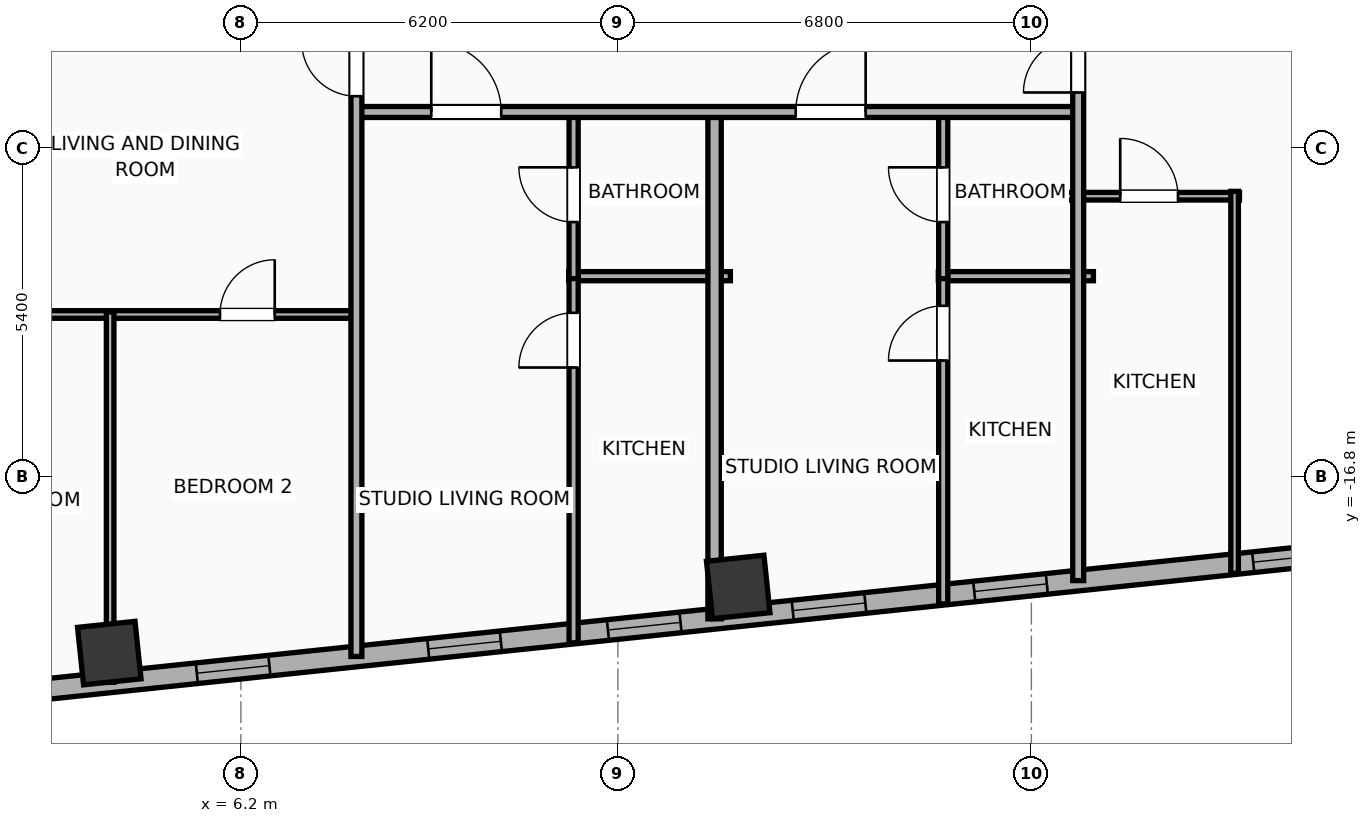
"""IFC4 building model, lengths in metres.
Left out: names, types, materials, properties, quantities, classifications, styles, units other than length and angle.
Written with IfcOpenShell. Run it as: python <this file> out.ifc"""

import sys

from ifc_helpers import new_model, si_unit, direction, frame, frame_2d, origin, origin_2d, place, context, subcontext, project, spatial, rectangle, hollow_rectangle, extrude, element, fill, save


model = new_model("IFC4")
c1 = context("Model", 3, precision=1e-05, world=origin(), true_north=direction((0.0, 1.0)))
c2 = subcontext(c1, "Body", "Model", "MODEL_VIEW")
j1 = project(units=[si_unit("LENGTHUNIT", "METRE"), si_unit("PLANEANGLEUNIT", "RADIAN")], contexts=[c1])
p1 = place(None, origin())
s1 = spatial("IfcSite", under=j1, at=p1, CompositionType="ELEMENT")
p2 = place(p1, origin())
s2 = spatial("IfcBuilding", under=s1, at=p2, CompositionType="ELEMENT")
p3 = place(p2, frame((0.0, 0.0, 175.5)))
s3 = spatial("IfcBuildingStorey", under=s2, at=p3, CompositionType="ELEMENT", Elevation=175.5)
for number, where, z_axis, x_axis in (
    (1, (4.036, -19.698, 0.0), (0.0, 0.0, 1.0), (0.995, 0.105, 0.0)),
    (2, (14.379, -18.611, 0.0), (0.0, 0.0, 1.0), (0.995, 0.105, 0.0)),
):
    element("IfcColumn", number, at=place(p3, frame(where, z_axis=z_axis, x_axis=x_axis)), inside=s3, PredefinedType="COLUMN", context=c2, shape_type="SweptSolid", body=[
        extrude(hollow_rectangle(XDim=0.95, YDim=0.95, WallThickness=0.032, at=origin_2d()), origin(), (0.0, 0.0, 1.0), 3.9),
    ])
p4 = place(p3, frame((24.756, -18.003, 0.0), z_axis=(0.0, 0.0, 1.0), x_axis=(-0.99452160744, -0.104531202687, 0.0)))
e3 = element("IfcWall", 3, at=p4, inside=s3, PredefinedType="ELEMENTEDWALL", context=c2, shape_type="SweptSolid", body=[
    extrude(rectangle(XDim=51.967, YDim=0.34, at=frame_2d((25.983, 0.0))), origin(), (0.0, 0.0, 1.0), 3.65),
])
p5 = place(p4, frame((25.633, 0.0, 0.75)))
e4 = element("IfcOpeningElement", 4, at=p5, cuts=e3, PredefinedType="OPENING", context=c2, shape_type="SweptSolid", body=[
    extrude(rectangle(XDim=2.4, YDim=2.1, at=frame_2d((1.2, 1.05))), frame((0.0, 0.18, 0.0), z_axis=(0.0, -1.0, 0.0), x_axis=(1.0, 0.0, 0.0)), (0.0, 0.0, 1.0), 0.36),
])
p6 = place(p4, frame((42.318, 0.0, 0.75)))
e5 = element("IfcOpeningElement", 5, at=p6, cuts=e3, PredefinedType="OPENING", context=c2, shape_type="SweptSolid", body=[
    extrude(rectangle(XDim=1.2, YDim=2.05, at=frame_2d((0.6, 1.025))), frame((0.0, 0.18, 0.0), z_axis=(0.0, -1.0, 0.0), x_axis=(1.0, 0.0, 0.0)), (0.0, 0.0, 1.0), 0.36),
])
p7 = place(p4, frame((34.121, 0.0, 0.75)))
e6 = element("IfcOpeningElement", 6, at=p7, cuts=e3, PredefinedType="OPENING", context=c2, shape_type="SweptSolid", body=[
    extrude(rectangle(XDim=1.2, YDim=2.05, at=frame_2d((0.6, 1.025))), frame((0.0, 0.18, 0.0), z_axis=(0.0, -1.0, 0.0), x_axis=(1.0, 0.0, 0.0)), (0.0, 0.0, 1.0), 0.36),
])
p8 = place(p4, frame((37.092, 0.0, 0.75)))
e7 = element("IfcOpeningElement", 7, at=p8, cuts=e3, PredefinedType="OPENING", context=c2, shape_type="SweptSolid", body=[
    extrude(rectangle(XDim=1.2, YDim=2.05, at=frame_2d((0.6, 1.025))), frame((0.0, 0.18, 0.0), z_axis=(0.0, -1.0, 0.0), x_axis=(1.0, 0.0, 0.0)), (0.0, 0.0, 1.0), 0.36),
])
p9 = place(p4, frame((14.359, 0.0, 0.75)))
e8 = element("IfcOpeningElement", 8, at=p9, cuts=e3, PredefinedType="OPENING", context=c2, shape_type="SweptSolid", body=[
    extrude(rectangle(XDim=1.2, YDim=2.05, at=frame_2d((0.6, 1.025))), frame((0.0, 0.18, 0.0), z_axis=(0.0, -1.0, 0.0), x_axis=(1.0, 0.0, 0.0)), (0.0, 0.0, 1.0), 0.36),
])
p10 = place(p4, frame((11.388, 0.0, 0.75)))
e9 = element("IfcOpeningElement", 9, at=p10, cuts=e3, PredefinedType="OPENING", context=c2, shape_type="SweptSolid", body=[
    extrude(rectangle(XDim=1.2, YDim=2.05, at=frame_2d((0.6, 1.025))), frame((0.0, 0.18, 0.0), z_axis=(0.0, -1.0, 0.0), x_axis=(1.0, 0.0, 0.0)), (0.0, 0.0, 1.0), 0.36),
])
p11 = place(p4, frame((8.332, 0.0, 0.75)))
e10 = element("IfcOpeningElement", 10, at=p11, cuts=e3, PredefinedType="OPENING", context=c2, shape_type="SweptSolid", body=[
    extrude(rectangle(XDim=1.2, YDim=2.05, at=frame_2d((0.6, 1.025))), frame((0.0, 0.18, 0.0), z_axis=(0.0, -1.0, 0.0), x_axis=(1.0, 0.0, 0.0)), (0.0, 0.0, 1.0), 0.36),
])
p12 = place(p4, frame((5.331, 0.0, 0.75)))
e11 = element("IfcOpeningElement", 11, at=p12, cuts=e3, PredefinedType="OPENING", context=c2, shape_type="SweptSolid", body=[
    extrude(rectangle(XDim=1.2, YDim=2.05, at=frame_2d((0.6, 1.025))), frame((0.0, 0.18, 0.0), z_axis=(0.0, -1.0, 0.0), x_axis=(1.0, 0.0, 0.0)), (0.0, 0.0, 1.0), 0.36),
])
p13 = place(p4, frame((29.313, 0.0, 0.75)))
e12 = element("IfcOpeningElement", 12, at=p13, cuts=e3, PredefinedType="OPENING", context=c2, shape_type="SweptSolid", body=[
    extrude(rectangle(XDim=1.2, YDim=2.05, at=frame_2d((0.6, 1.025))), frame((0.0, 0.18, 0.0), z_axis=(0.0, -1.0, 0.0), x_axis=(1.0, 0.0, 0.0)), (0.0, 0.0, 1.0), 0.36),
])
p14 = place(p4, frame((22.248, 0.0, 0.75)))
e13 = element("IfcOpeningElement", 13, at=p14, cuts=e3, PredefinedType="OPENING", context=c2, shape_type="SweptSolid", body=[
    extrude(rectangle(XDim=1.2, YDim=2.05, at=frame_2d((0.6, 1.025))), frame((0.0, 0.18, 0.0), z_axis=(0.0, -1.0, 0.0), x_axis=(1.0, 0.0, 0.0)), (0.0, 0.0, 1.0), 0.36),
])
p15 = place(p4, frame((18.186, 0.0, 0.75)))
e14 = element("IfcOpeningElement", 14, at=p15, cuts=e3, PredefinedType="OPENING", context=c2, shape_type="SweptSolid", body=[
    extrude(rectangle(XDim=1.2, YDim=2.05, at=frame_2d((0.6, 1.025))), frame((0.0, 0.18, 0.0), z_axis=(0.0, -1.0, 0.0), x_axis=(1.0, 0.0, 0.0)), (0.0, 0.0, 1.0), 0.36),
])
p16 = place(p4, frame((48.13, 0.0, 0.75)))
e15 = element("IfcOpeningElement", 15, at=p16, cuts=e3, PredefinedType="OPENING", context=c2, shape_type="SweptSolid", body=[
    extrude(rectangle(XDim=1.2, YDim=2.05, at=frame_2d((0.6, 1.025))), frame((0.0, 0.18, 0.0), z_axis=(0.0, -1.0, 0.0), x_axis=(1.0, 0.0, 0.0)), (0.0, 0.0, 1.0), 0.36),
])
p17 = place(p4, frame((50.09, 0.0, 0.75)))
e16 = element("IfcOpeningElement", 16, at=p17, cuts=e3, PredefinedType="OPENING", context=c2, shape_type="SweptSolid", body=[
    extrude(rectangle(XDim=1.2, YDim=2.05, at=frame_2d((0.6, 1.025))), frame((0.0, 0.18, 0.0), z_axis=(0.0, -1.0, 0.0), x_axis=(1.0, 0.0, 0.0)), (0.0, 0.0, 1.0), 0.36),
])
p18 = place(p4, frame((0.718, 0.0, 0.75)))
e17 = element("IfcOpeningElement", 17, at=p18, cuts=e3, PredefinedType="OPENING", context=c2, shape_type="SweptSolid", body=[
    extrude(rectangle(XDim=1.2, YDim=2.05, at=frame_2d((0.6, 1.025))), frame((0.0, 0.18, 0.0), z_axis=(0.0, -1.0, 0.0), x_axis=(1.0, 0.0, 0.0)), (0.0, 0.0, 1.0), 0.36),
])
p19 = place(p3, frame((11.592, -13.5, 0.0), z_axis=(0.0, 0.0, 1.0), x_axis=(1.0, 0.0, 0.0)))
e18 = element("IfcWall", 18, at=p19, inside=s3, PredefinedType="PLUMBINGWALL", context=c2, shape_type="SweptSolid", body=[
    extrude(rectangle(XDim=2.658, YDim=0.15, at=frame_2d((1.329, 0.0))), origin(), (0.0, 0.0, 1.0), 3.65),
])
p20 = place(p3, frame((11.672, -19.529, 0.0), z_axis=(0.0, 0.0, 1.0), x_axis=(0.0, 1.0, 0.0)))
e19 = element("IfcWall", 19, at=p20, inside=s3, PredefinedType="PLUMBINGWALL", context=c2, shape_type="SweptSolid", body=[
    extrude(rectangle(XDim=6.069, YDim=0.15, at=frame_2d((3.035, 0.0))), origin(), (0.0, 0.0, 1.0), 3.65),
])
p21 = place(p20, frame((4.527, 0.0, 0.0)))
e20 = element("IfcOpeningElement", 20, at=p21, cuts=e19, PredefinedType="OPENING", context=c2, shape_type="SweptSolid", body=[
    extrude(rectangle(XDim=0.9, YDim=2.05, at=frame_2d((0.45, 1.025))), frame((0.0, 0.085, 0.0), z_axis=(0.0, -1.0, 0.0), x_axis=(1.0, 0.0, 0.0)), (0.0, 0.0, 1.0), 0.17),
])
p22 = place(p3, frame((11.672, -13.54, 0.0), z_axis=(0.0, 0.0, 1.0), x_axis=(0.0, 1.0, 0.0)))
e21 = element("IfcWall", 21, at=p22, inside=s3, PredefinedType="PLUMBINGWALL", context=c2, shape_type="SweptSolid", body=[
    extrude(rectangle(XDim=2.76, YDim=0.15, at=frame_2d((1.38, 0.0))), origin(), (0.0, 0.0, 1.0), 3.65),
])
p23 = place(p22, frame((0.93, 0.0, 0.0)))
e22 = element("IfcOpeningElement", 22, at=p23, cuts=e21, PredefinedType="OPENING", context=c2, shape_type="SweptSolid", body=[
    extrude(rectangle(XDim=0.9, YDim=2.05, at=frame_2d((0.45, 1.025))), frame((0.0, 0.085, 0.0), z_axis=(0.0, -1.0, 0.0), x_axis=(1.0, 0.0, 0.0)), (0.0, 0.0, 1.0), 0.17),
])
p24 = place(p3, frame((13.99, -19.135, 0.0), z_axis=(0.0, 0.0, 1.0), x_axis=(0.0, 1.0, 0.0)))
e23 = element("IfcWall", 23, at=p24, inside=s3, PredefinedType="PARTITIONING", context=c2, shape_type="SweptSolid", body=[
    extrude(rectangle(XDim=8.415, YDim=0.22, at=frame_2d((4.208, 0.0))), origin(), (0.0, 0.0, 1.0), 3.65),
])
p25 = place(p3, frame((17.67, -13.5, 0.0), z_axis=(0.0, 0.0, 1.0), x_axis=(1.0, 0.0, 0.0)))
e24 = element("IfcWall", 24, at=p25, inside=s3, PredefinedType="PLUMBINGWALL", context=c2, shape_type="SweptSolid", body=[
    extrude(rectangle(XDim=2.55, YDim=0.15, at=frame_2d((1.275, 0.0))), origin(), (0.0, 0.0, 1.0), 3.65),
])
p26 = place(p3, frame((17.75, -18.89, 0.0), z_axis=(0.0, 0.0, 1.0), x_axis=(0.0, 1.0, 0.0)))
e25 = element("IfcWall", 25, at=p26, inside=s3, PredefinedType="PLUMBINGWALL", context=c2, shape_type="SweptSolid", body=[
    extrude(rectangle(XDim=5.43, YDim=0.15, at=frame_2d((2.715, 0.0))), origin(), (0.0, 0.0, 1.0), 3.65),
])
p27 = place(p26, frame((4.003, 0.0, 0.0)))
e26 = element("IfcOpeningElement", 26, at=p27, cuts=e25, PredefinedType="OPENING", context=c2, shape_type="SweptSolid", body=[
    extrude(rectangle(XDim=0.9, YDim=2.05, at=frame_2d((0.45, 1.025))), frame((0.0, 0.085, 0.0), z_axis=(0.0, -1.0, 0.0), x_axis=(1.0, 0.0, 0.0)), (0.0, 0.0, 1.0), 0.17),
])
p28 = place(p3, frame((17.75, -13.54, 0.0), z_axis=(0.0, 0.0, 1.0), x_axis=(0.0, 1.0, 0.0)))
e27 = element("IfcWall", 27, at=p28, inside=s3, PredefinedType="PLUMBINGWALL", context=c2, shape_type="SweptSolid", body=[
    extrude(rectangle(XDim=2.76, YDim=0.15, at=frame_2d((1.38, 0.0))), origin(), (0.0, 0.0, 1.0), 3.65),
])
p29 = place(p28, frame((0.93, 0.0, 0.0)))
e28 = element("IfcOpeningElement", 28, at=p29, cuts=e27, PredefinedType="OPENING", context=c2, shape_type="SweptSolid", body=[
    extrude(rectangle(XDim=0.9, YDim=2.05, at=frame_2d((0.45, 1.025))), frame((0.0, 0.085, 0.0), z_axis=(0.0, -1.0, 0.0), x_axis=(1.0, 0.0, 0.0)), (0.0, 0.0, 1.0), 0.17),
])
p30 = place(p3, frame((8.08, -10.8, 0.0), z_axis=(0.0, 0.0, 1.0), x_axis=(1.0, 0.0, 0.0)))
e29 = element("IfcWall", 29, at=p30, inside=s3, PredefinedType="PARTITIONING", context=c2, shape_type="SweptSolid", body=[
    extrude(rectangle(XDim=11.92, YDim=0.18, at=frame_2d((5.96, 0.0))), origin(), (0.0, 0.0, 1.0), 3.65),
])
p31 = place(p30, frame((1.251, 0.0, 0.0)))
e30 = element("IfcOpeningElement", 30, at=p31, cuts=e29, PredefinedType="OPENING", context=c2, shape_type="SweptSolid", body=[
    extrude(rectangle(XDim=1.15, YDim=2.05, at=frame_2d((0.575, 1.025))), frame((0.0, 0.1, 0.0), z_axis=(0.0, -1.0, 0.0), x_axis=(1.0, 0.0, 0.0)), (0.0, 0.0, 1.0), 0.2),
])
p32 = place(p30, frame((7.244, 0.0, 0.0)))
e31 = element("IfcOpeningElement", 31, at=p32, cuts=e29, PredefinedType="OPENING", context=c2, shape_type="SweptSolid", body=[
    extrude(rectangle(XDim=1.15, YDim=2.05, at=frame_2d((0.575, 1.025))), frame((0.0, 0.1, 0.0), z_axis=(0.0, -1.0, 0.0), x_axis=(1.0, 0.0, 0.0)), (0.0, 0.0, 1.0), 0.2),
])
p33 = place(p3, frame((0.02, -14.13, 0.0), z_axis=(0.0, 0.0, 1.0), x_axis=(1.0, 0.0, 0.0)))
e32 = element("IfcWall", 32, at=p33, inside=s3, PredefinedType="PARTITIONING", context=c2, shape_type="SweptSolid", body=[
    extrude(rectangle(XDim=8.06, YDim=0.125, at=frame_2d((4.03, 0.0))), origin(), (0.0, 0.0, 1.0), 3.65),
])
p34 = place(p33, frame((1.323, 0.0, 0.0)))
e33 = element("IfcOpeningElement", 33, at=p34, cuts=e32, PredefinedType="OPENING", context=c2, shape_type="SweptSolid", body=[
    extrude(rectangle(XDim=0.9, YDim=2.05, at=frame_2d((0.45, 1.025))), frame((0.0, 0.073, 0.0), z_axis=(0.0, -1.0, 0.0), x_axis=(1.0, 0.0, 0.0)), (0.0, 0.0, 1.0), 0.145),
])
p35 = place(p33, frame((5.837, 0.0, 0.0)))
e34 = element("IfcOpeningElement", 34, at=p35, cuts=e32, PredefinedType="OPENING", context=c2, shape_type="SweptSolid", body=[
    extrude(rectangle(XDim=0.9, YDim=2.05, at=frame_2d((0.45, 1.025))), frame((0.0, 0.073, 0.0), z_axis=(0.0, -1.0, 0.0), x_axis=(1.0, 0.0, 0.0)), (0.0, 0.0, 1.0), 0.145),
])
p36 = place(p3, frame((4.05, -20.179, 0.0), z_axis=(0.0, 0.0, 1.0), x_axis=(0.0, 1.0, 0.0)))
e35 = element("IfcWall", 35, at=p36, inside=s3, PredefinedType="PARTITIONING", context=c2, shape_type="SweptSolid", body=[
    extrude(rectangle(XDim=6.089, YDim=0.125, at=frame_2d((3.045, 0.0))), origin(), (0.0, 0.0, 1.0), 3.04),
])
p37 = place(p3, frame((8.1, -19.754, 0.0), z_axis=(0.0, 0.0, 1.0), x_axis=(0.0, 1.0, 0.0)))
e36 = element("IfcWall", 36, at=p37, inside=s3, PredefinedType="PARTITIONING", context=c2, shape_type="SweptSolid", body=[
    extrude(rectangle(XDim=10.464, YDim=0.18, at=frame_2d((5.232, 0.0))), origin(), (0.0, 0.0, 1.0), 3.65),
])
p38 = place(p37, frame((9.213, 0.0, 0.0)))
e37 = element("IfcOpeningElement", 37, at=p38, cuts=e36, PredefinedType="OPENING", context=c2, shape_type="SweptSolid", body=[
    extrude(rectangle(XDim=0.9, YDim=2.05, at=frame_2d((0.45, 1.025))), frame((0.0, 0.1, 0.0), z_axis=(0.0, -1.0, 0.0), x_axis=(1.0, 0.0, 0.0)), (0.0, 0.0, 1.0), 0.2),
])
p39 = place(p3, frame((19.65, -12.185, 0.0), z_axis=(0.0, 0.0, 1.0), x_axis=(1.0, 0.0, 0.0)))
e38 = element("IfcWall", 38, at=p39, inside=s3, PredefinedType="PARTITIONING", context=c2, shape_type="SweptSolid", body=[
    extrude(rectangle(XDim=2.972, YDim=0.125, at=frame_2d((1.486, 0.0))), origin(), (0.0, 0.0, 1.0), 3.65),
])
p40 = place(p39, frame((1.011, 0.0, 0.0)))
e39 = element("IfcOpeningElement", 39, at=p40, cuts=e38, PredefinedType="OPENING", context=c2, shape_type="SweptSolid", body=[
    extrude(rectangle(XDim=0.95, YDim=2.05, at=frame_2d((0.475, 1.025))), frame((0.0, 0.073, 0.0), z_axis=(0.0, -1.0, 0.0), x_axis=(1.0, 0.0, 0.0)), (0.0, 0.0, 1.0), 0.145),
])
p41 = place(p3, frame((22.542, -18.387, 0.0), z_axis=(0.0, 0.0, 1.0), x_axis=(0.0, 1.0, 0.0)))
e40 = element("IfcWall", 40, at=p41, inside=s3, PredefinedType="PARTITIONING", context=c2, shape_type="SweptSolid", body=[
    extrude(rectangle(XDim=6.282, YDim=0.125, at=frame_2d((3.141, 0.0))), origin(), (0.0, 0.0, 1.0), 3.65),
])
p42 = place(p3, frame((19.97, -18.506, 0.0), z_axis=(0.0, 0.0, 1.0), x_axis=(0.0, 1.0, 0.0)))
e41 = element("IfcWall", 41, at=p42, inside=s3, PredefinedType="PARTITIONING", context=c2, shape_type="SweptSolid", body=[
    extrude(rectangle(XDim=16.706, YDim=0.18, at=frame_2d((8.353, 0.0))), origin(), (0.0, 0.0, 1.0), 3.65),
])
p43 = place(p42, frame((8.027, 0.0, 0.0)))
e42 = element("IfcOpeningElement", 42, at=p43, cuts=e41, PredefinedType="OPENING", context=c2, shape_type="SweptSolid", body=[
    extrude(rectangle(XDim=0.9, YDim=2.05, at=frame_2d((0.45, 1.025))), frame((0.0, 0.1, 0.0), z_axis=(0.0, -1.0, 0.0), x_axis=(1.0, 0.0, 0.0)), (0.0, 0.0, 1.0), 0.2),
])
p44 = place(p9, origin())
e43 = element("IfcWindow", 43, at=p44, inside=s3, PartitioningType="SINGLE_PANEL", PredefinedType="WINDOW", context=c2, shape_type="SweptSolid", body=[
    extrude(rectangle(XDim=1.2, YDim=2.05, at=frame_2d((0.6, 1.025))), frame((0.0, 0.03, 0.0), z_axis=(0.0, -1.0, 0.0), x_axis=(1.0, 0.0, 0.0)), (0.0, 0.0, 1.0), 0.06),
])
fill(e8, e43)
p45 = place(p10, origin())
e44 = element("IfcWindow", 44, at=p45, inside=s3, PartitioningType="SINGLE_PANEL", PredefinedType="WINDOW", context=c2, shape_type="SweptSolid", body=[
    extrude(rectangle(XDim=1.2, YDim=2.05, at=frame_2d((0.6, 1.025))), frame((0.0, 0.03, 0.0), z_axis=(0.0, -1.0, 0.0), x_axis=(1.0, 0.0, 0.0)), (0.0, 0.0, 1.0), 0.06),
])
fill(e9, e44)
p46 = place(p11, origin())
e45 = element("IfcWindow", 45, at=p46, inside=s3, PartitioningType="SINGLE_PANEL", PredefinedType="WINDOW", context=c2, shape_type="SweptSolid", body=[
    extrude(rectangle(XDim=1.2, YDim=2.05, at=frame_2d((0.6, 1.025))), frame((0.0, 0.03, 0.0), z_axis=(0.0, -1.0, 0.0), x_axis=(1.0, 0.0, 0.0)), (0.0, 0.0, 1.0), 0.06),
])
fill(e10, e45)
p47 = place(p12, origin())
e46 = element("IfcWindow", 46, at=p47, inside=s3, PartitioningType="SINGLE_PANEL", PredefinedType="WINDOW", context=c2, shape_type="SweptSolid", body=[
    extrude(rectangle(XDim=1.2, YDim=2.05, at=frame_2d((0.6, 1.025))), frame((0.0, 0.03, 0.0), z_axis=(0.0, -1.0, 0.0), x_axis=(1.0, 0.0, 0.0)), (0.0, 0.0, 1.0), 0.06),
])
fill(e11, e46)
p48 = place(p15, origin())
e47 = element("IfcWindow", 47, at=p48, inside=s3, PartitioningType="SINGLE_PANEL", PredefinedType="WINDOW", context=c2, shape_type="SweptSolid", body=[
    extrude(rectangle(XDim=1.2, YDim=2.05, at=frame_2d((0.6, 1.025))), frame((0.0, 0.03, 0.0), z_axis=(0.0, -1.0, 0.0), x_axis=(1.0, 0.0, 0.0)), (0.0, 0.0, 1.0), 0.06),
])
fill(e14, e47)
p49 = place(p18, origin())
e48 = element("IfcWindow", 48, at=p49, inside=s3, PartitioningType="SINGLE_PANEL", PredefinedType="WINDOW", context=c2, shape_type="SweptSolid", body=[
    extrude(rectangle(XDim=1.2, YDim=2.05, at=frame_2d((0.6, 1.025))), frame((0.0, 0.03, 0.0), z_axis=(0.0, -1.0, 0.0), x_axis=(1.0, 0.0, 0.0)), (0.0, 0.0, 1.0), 0.06),
])
fill(e17, e48)
p50 = place(p21, origin())
e49 = element("IfcDoor", 49, at=p50, inside=s3, OperationType="SINGLE_SWING_LEFT", PredefinedType="DOOR", context=c2, shape_type="SweptSolid", body=[
    extrude(rectangle(XDim=0.9, YDim=2.05, at=frame_2d((0.45, 1.025))), frame((0.0, 0.025, 0.0), z_axis=(0.0, -1.0, 0.0), x_axis=(1.0, 0.0, 0.0)), (0.0, 0.0, 1.0), 0.05),
])
fill(e20, e49)
p51 = place(p23, origin())
e50 = element("IfcDoor", 50, at=p51, inside=s3, OperationType="SINGLE_SWING_RIGHT", PredefinedType="DOOR", context=c2, shape_type="SweptSolid", body=[
    extrude(rectangle(XDim=0.9, YDim=2.05, at=frame_2d((0.45, 1.025))), frame((0.0, 0.025, 0.0), z_axis=(0.0, -1.0, 0.0), x_axis=(1.0, 0.0, 0.0)), (0.0, 0.0, 1.0), 0.05),
])
fill(e22, e50)
p52 = place(p27, origin())
e51 = element("IfcDoor", 51, at=p52, inside=s3, OperationType="SINGLE_SWING_LEFT", PredefinedType="DOOR", context=c2, shape_type="SweptSolid", body=[
    extrude(rectangle(XDim=0.9, YDim=2.05, at=frame_2d((0.45, 1.025))), frame((0.0, 0.025, 0.0), z_axis=(0.0, -1.0, 0.0), x_axis=(1.0, 0.0, 0.0)), (0.0, 0.0, 1.0), 0.05),
])
fill(e26, e51)
p53 = place(p29, origin())
e52 = element("IfcDoor", 52, at=p53, inside=s3, OperationType="SINGLE_SWING_RIGHT", PredefinedType="DOOR", context=c2, shape_type="SweptSolid", body=[
    extrude(rectangle(XDim=0.9, YDim=2.05, at=frame_2d((0.45, 1.025))), frame((0.0, 0.025, 0.0), z_axis=(0.0, -1.0, 0.0), x_axis=(1.0, 0.0, 0.0)), (0.0, 0.0, 1.0), 0.05),
])
fill(e28, e52)
p54 = place(p31, origin())
e53 = element("IfcDoor", 53, at=p54, inside=s3, OperationType="SINGLE_SWING_LEFT", PredefinedType="DOOR", context=c2, shape_type="SweptSolid", body=[
    extrude(rectangle(XDim=1.15, YDim=2.05, at=frame_2d((0.575, 1.025))), frame((0.0, 0.025, 0.0), z_axis=(0.0, -1.0, 0.0), x_axis=(1.0, 0.0, 0.0)), (0.0, 0.0, 1.0), 0.05),
])
fill(e30, e53)
p55 = place(p32, origin())
e54 = element("IfcDoor", 54, at=p55, inside=s3, OperationType="SINGLE_SWING_RIGHT", PredefinedType="DOOR", context=c2, shape_type="SweptSolid", body=[
    extrude(rectangle(XDim=1.15, YDim=2.05, at=frame_2d((0.575, 1.025))), frame((0.0, 0.025, 0.0), z_axis=(0.0, -1.0, 0.0), x_axis=(1.0, 0.0, 0.0)), (0.0, 0.0, 1.0), 0.05),
])
fill(e31, e54)
p56 = place(p35, origin())
e55 = element("IfcDoor", 55, at=p56, inside=s3, OperationType="SINGLE_SWING_RIGHT", PredefinedType="DOOR", context=c2, shape_type="SweptSolid", body=[
    extrude(rectangle(XDim=0.9, YDim=2.05, at=frame_2d((0.45, 1.025))), frame((0.0, 0.025, 0.0), z_axis=(0.0, -1.0, 0.0), x_axis=(1.0, 0.0, 0.0)), (0.0, 0.0, 1.0), 0.05),
])
fill(e34, e55)
p57 = place(p38, origin())
e56 = element("IfcDoor", 56, at=p57, inside=s3, OperationType="SINGLE_SWING_RIGHT", PredefinedType="DOOR", context=c2, shape_type="SweptSolid", body=[
    extrude(rectangle(XDim=0.9, YDim=2.05, at=frame_2d((0.45, 1.025))), frame((0.0, 0.025, 0.0), z_axis=(0.0, -1.0, 0.0), x_axis=(1.0, 0.0, 0.0)), (0.0, 0.0, 1.0), 0.05),
])
fill(e37, e56)
p58 = place(p40, origin())
e57 = element("IfcDoor", 57, at=p58, inside=s3, OperationType="SINGLE_SWING_LEFT", PredefinedType="DOOR", context=c2, shape_type="SweptSolid", body=[
    extrude(rectangle(XDim=0.95, YDim=2.05, at=frame_2d((0.475, 1.025))), frame((0.0, 0.025, 0.0), z_axis=(0.0, -1.0, 0.0), x_axis=(1.0, 0.0, 0.0)), (0.0, 0.0, 1.0), 0.05),
])
fill(e39, e57)
p59 = place(p43, origin())
e58 = element("IfcDoor", 58, at=p59, inside=s3, OperationType="SINGLE_SWING_LEFT", PredefinedType="DOOR", context=c2, shape_type="SweptSolid", body=[
    extrude(rectangle(XDim=0.9, YDim=2.05, at=frame_2d((0.45, 1.025))), frame((0.0, 0.025, 0.0), z_axis=(0.0, -1.0, 0.0), x_axis=(1.0, 0.0, 0.0)), (0.0, 0.0, 1.0), 0.05),
])
fill(e42, e58)
save(model, sys.argv[1])
